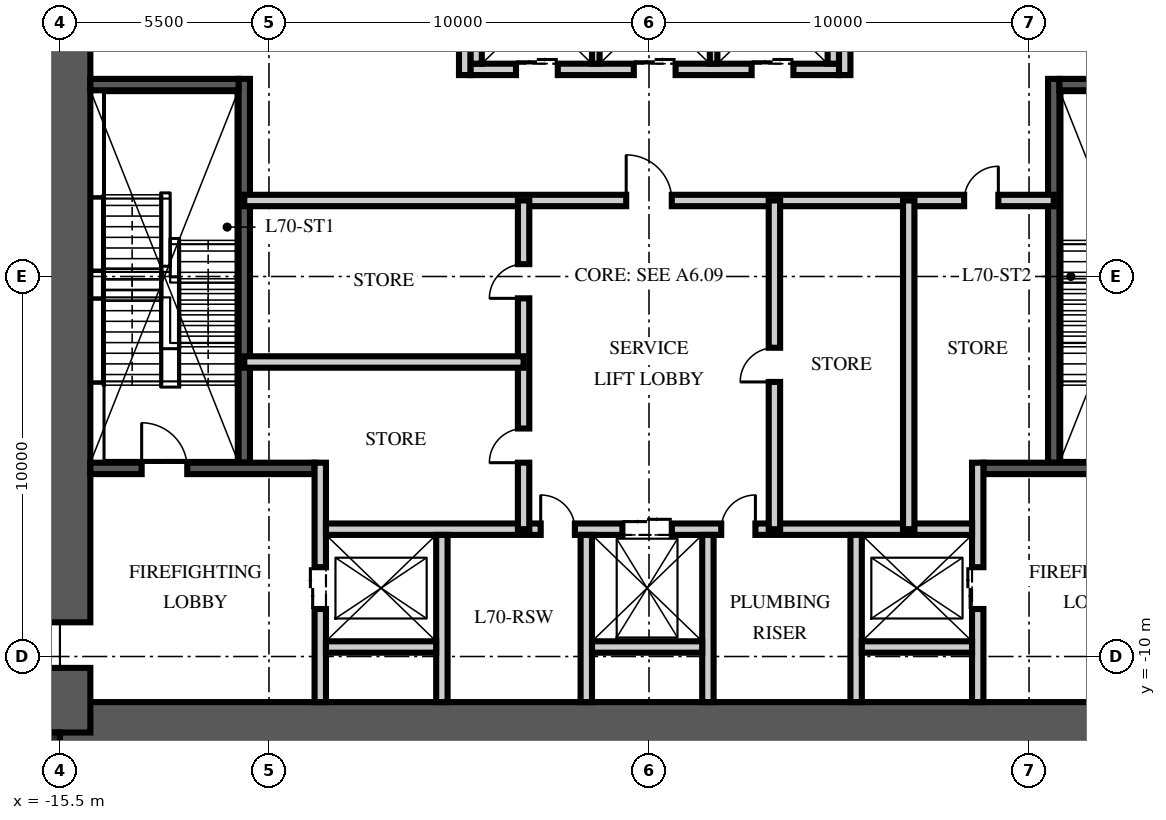
"""IFC4 building model, lengths in metres.
Left out: names, types, materials, properties, quantities, classifications, styles, units other than length and angle.
Written with IfcOpenShell. Run it as: python <this file> out.ifc"""

import sys

from ifc_helpers import new_model, si_unit, direction, frame, frame_2d, origin, origin_2d, place, context, subcontext, project, spatial, rectangle, extrude, element, fill, save


model = new_model("IFC4")
c1 = context("Model", 3, precision=1e-05, world=origin(), true_north=direction((0.0, 1.0)))
c2 = subcontext(c1, "Body", "Model", "MODEL_VIEW")
j1 = project(units=[si_unit("LENGTHUNIT", "METRE"), si_unit("PLANEANGLEUNIT", "RADIAN")], contexts=[c1])
p1 = place(None, origin())
s1 = spatial("IfcSite", under=j1, at=p1, CompositionType="ELEMENT")
p2 = place(p1, origin())
s2 = spatial("IfcBuilding", under=s1, at=p2, CompositionType="ELEMENT")
p3 = place(p2, frame((0.0, 0.0, 278.25)))
s3 = spatial("IfcBuildingStorey", under=s2, at=p3, CompositionType="ELEMENT", Elevation=278.25)
p4 = place(p3, frame((-15.5, -12.0, -0.35), z_axis=(0.0, 0.0, 1.0), x_axis=(1.0, 0.0, 0.0)))
e1 = element("IfcWall", 1, at=p4, inside=s3, PredefinedType="SHEAR", context=c2, shape_type="SweptSolid", body=[
    extrude(rectangle(XDim=31.0, YDim=1.6, at=frame_2d((15.5, 0.0))), origin(), (0.0, 0.0, 1.0), 7.6),
])
p5 = place(p3, frame((-15.5, -12.0, -0.35), z_axis=(0.0, 0.0, 1.0), x_axis=(0.0, 1.0, 0.0)))
e2 = element("IfcWall", 2, at=p5, inside=s3, PredefinedType="SHEAR", context=c2, shape_type="SweptSolid", body=[
    extrude(rectangle(XDim=24.0, YDim=1.6, at=frame_2d((12.0, 0.0))), origin(), (0.0, 0.0, 1.0), 7.6),
])
p6 = place(p5, frame((1.7, 0.0, 0.35)))
e3 = element("IfcOpeningElement", 3, at=p6, cuts=e2, PredefinedType="OPENING", context=c2, shape_type="SweptSolid", body=[
    extrude(rectangle(XDim=1.2, YDim=2.1, at=frame_2d((0.6, 1.05))), frame((0.0, 0.81, 0.0), z_axis=(0.0, -1.0, 0.0), x_axis=(1.0, 0.0, 0.0)), (0.0, 0.0, 1.0), 1.62),
])
p7 = place(p5, frame((21.1, 0.0, 0.35)))
e4 = element("IfcOpeningElement", 4, at=p7, cuts=e2, PredefinedType="OPENING", context=c2, shape_type="SweptSolid", body=[
    extrude(rectangle(XDim=1.8, YDim=2.1, at=frame_2d((0.9, 1.05))), frame((0.0, 0.81, 0.0), z_axis=(0.0, -1.0, 0.0), x_axis=(1.0, 0.0, 0.0)), (0.0, 0.0, 1.0), 1.62),
])
p8 = place(p3, frame((-15.9, -12.4, -0.35), z_axis=(0.0, 0.0, 1.0), x_axis=(1.0, 0.0, 0.0)))
e5 = element("IfcColumn", 5, at=p8, inside=s3, PredefinedType="COLUMN", context=c2, shape_type="SweptSolid", body=[
    extrude(rectangle(XDim=0.8, YDim=0.8, at=origin_2d()), origin(), (0.0, 0.0, 1.0), 7.6),
])
p9 = place(p3, frame((-10.65, -4.9, 0.0), z_axis=(0.0, 0.0, 1.0), x_axis=(0.0, 1.0, 0.0)))
e6 = element("IfcWall", 6, at=p9, inside=s3, PredefinedType="SOLIDWALL", context=c2, shape_type="SweptSolid", body=[
    extrude(rectangle(XDim=10.1, YDim=0.3, at=frame_2d((5.05, 0.0))), origin(), (0.0, 0.0, 1.0), 7.25),
])
p10 = place(p3, frame((-14.7, -5.05, 0.0), z_axis=(0.0, 0.0, 1.0), x_axis=(1.0, 0.0, 0.0)))
e7 = element("IfcWall", 7, at=p10, inside=s3, PredefinedType="SOLIDWALL", context=c2, shape_type="SweptSolid", body=[
    extrude(rectangle(XDim=5.9, YDim=0.3, at=frame_2d((2.95, 0.0))), origin(), (0.0, 0.0, 1.0), 7.25),
])
p11 = place(p10, frame((1.35, 0.0, 0.0)))
e8 = element("IfcOpeningElement", 8, at=p11, cuts=e7, PredefinedType="OPENING", context=c2, shape_type="SweptSolid", body=[
    extrude(rectangle(XDim=1.2, YDim=2.1, at=frame_2d((0.6, 1.05))), frame((0.0, 0.16, 0.0), z_axis=(0.0, -1.0, 0.0), x_axis=(1.0, 0.0, 0.0)), (0.0, 0.0, 1.0), 0.32),
])
p12 = place(p3, frame((-14.7, 5.05, 0.0), z_axis=(0.0, 0.0, 1.0), x_axis=(1.0, 0.0, 0.0)))
e9 = element("IfcWall", 9, at=p12, inside=s3, PredefinedType="SOLIDWALL", context=c2, shape_type="SweptSolid", body=[
    extrude(rectangle(XDim=3.9, YDim=0.3, at=frame_2d((1.95, 0.0))), origin(), (0.0, 0.0, 1.0), 7.25),
])
p13 = place(p3, frame((-8.65, -11.2, 0.0), z_axis=(0.0, 0.0, 1.0), x_axis=(0.0, 1.0, 0.0)))
e10 = element("IfcWall", 10, at=p13, inside=s3, PredefinedType="PARTITIONING", context=c2, shape_type="SweptSolid", body=[
    extrude(rectangle(XDim=6.3, YDim=0.3, at=frame_2d((3.15, 0.0))), origin(), (0.0, 0.0, 1.0), 7.25),
])
p14 = place(p13, frame((2.45, 0.0, 0.0)))
e11 = element("IfcOpeningElement", 11, at=p14, cuts=e10, PredefinedType="OPENING", context=c2, shape_type="SweptSolid", body=[
    extrude(rectangle(XDim=1.1, YDim=2.1, at=frame_2d((0.55, 1.05))), frame((0.0, 0.16, 0.0), z_axis=(0.0, -1.0, 0.0), x_axis=(1.0, 0.0, 0.0)), (0.0, 0.0, 1.0), 0.32),
])
p15 = place(p3, frame((10.65, -4.9, 0.0), z_axis=(0.0, 0.0, 1.0), x_axis=(0.0, 1.0, 0.0)))
e12 = element("IfcWall", 12, at=p15, inside=s3, PredefinedType="SOLIDWALL", context=c2, shape_type="SweptSolid", body=[
    extrude(rectangle(XDim=10.1, YDim=0.3, at=frame_2d((5.05, 0.0))), origin(), (0.0, 0.0, 1.0), 7.25),
])
p16 = place(p3, frame((14.7, -5.05, 0.0), z_axis=(0.0, 0.0, 1.0), x_axis=(-1.0, 0.0, 0.0)))
e13 = element("IfcWall", 13, at=p16, inside=s3, PredefinedType="SOLIDWALL", context=c2, shape_type="SweptSolid", body=[
    extrude(rectangle(XDim=5.9, YDim=0.3, at=frame_2d((2.95, 0.0))), origin(), (0.0, 0.0, 1.0), 7.25),
])
p17 = place(p16, frame((1.35, 0.0, 0.0)))
e14 = element("IfcOpeningElement", 14, at=p17, cuts=e13, PredefinedType="OPENING", context=c2, shape_type="SweptSolid", body=[
    extrude(rectangle(XDim=1.2, YDim=2.1, at=frame_2d((0.6, 1.05))), frame((0.0, 0.16, 0.0), z_axis=(0.0, -1.0, 0.0), x_axis=(1.0, 0.0, 0.0)), (0.0, 0.0, 1.0), 0.32),
])
p18 = place(p3, frame((14.7, 5.05, 0.0), z_axis=(0.0, 0.0, 1.0), x_axis=(-1.0, 0.0, 0.0)))
e15 = element("IfcWall", 15, at=p18, inside=s3, PredefinedType="SOLIDWALL", context=c2, shape_type="SweptSolid", body=[
    extrude(rectangle(XDim=3.9, YDim=0.3, at=frame_2d((1.95, 0.0))), origin(), (0.0, 0.0, 1.0), 7.25),
])
p19 = place(p3, frame((8.65, -11.2, 0.0), z_axis=(0.0, 0.0, 1.0), x_axis=(0.0, 1.0, 0.0)))
e16 = element("IfcWall", 16, at=p19, inside=s3, PredefinedType="PARTITIONING", context=c2, shape_type="SweptSolid", body=[
    extrude(rectangle(XDim=6.3, YDim=0.3, at=frame_2d((3.15, 0.0))), origin(), (0.0, 0.0, 1.0), 7.25),
])
p20 = place(p19, frame((2.45, 0.0, 0.0)))
e17 = element("IfcOpeningElement", 17, at=p20, cuts=e16, PredefinedType="OPENING", context=c2, shape_type="SweptSolid", body=[
    extrude(rectangle(XDim=1.1, YDim=2.1, at=frame_2d((0.55, 1.05))), frame((0.0, 0.16, 0.0), z_axis=(0.0, -1.0, 0.0), x_axis=(1.0, 0.0, 0.0)), (0.0, 0.0, 1.0), 0.32),
])
p21 = place(p3, frame((-8.5, -6.65, 0.0), z_axis=(0.0, 0.0, 1.0), x_axis=(1.0, 0.0, 0.0)))
e18 = element("IfcWall", 18, at=p21, inside=s3, PredefinedType="PARTITIONING", context=c2, shape_type="SweptSolid", body=[
    extrude(rectangle(XDim=17.0, YDim=0.3, at=frame_2d((8.5, 0.0))), origin(), (0.0, 0.0, 1.0), 7.25),
])
p22 = place(p21, frame((7.8, 0.0, 0.0)))
e19 = element("IfcOpeningElement", 19, at=p22, cuts=e18, PredefinedType="OPENING", context=c2, shape_type="SweptSolid", body=[
    extrude(rectangle(XDim=1.3, YDim=2.4, at=frame_2d((0.65, 1.2))), frame((0.0, 0.16, 0.0), z_axis=(0.0, -1.0, 0.0), x_axis=(1.0, 0.0, 0.0)), (0.0, 0.0, 1.0), 0.32),
])
p23 = place(p21, frame((5.65, 0.0, 0.0)))
e20 = element("IfcOpeningElement", 20, at=p23, cuts=e18, PredefinedType="OPENING", context=c2, shape_type="SweptSolid", body=[
    extrude(rectangle(XDim=0.9, YDim=2.1, at=frame_2d((0.45, 1.05))), frame((0.0, 0.16, 0.0), z_axis=(0.0, -1.0, 0.0), x_axis=(1.0, 0.0, 0.0)), (0.0, 0.0, 1.0), 0.32),
])
p24 = place(p21, frame((10.4, 0.0, 0.0)))
e21 = element("IfcOpeningElement", 21, at=p24, cuts=e18, PredefinedType="OPENING", context=c2, shape_type="SweptSolid", body=[
    extrude(rectangle(XDim=0.9, YDim=2.1, at=frame_2d((0.45, 1.05))), frame((0.0, 0.16, 0.0), z_axis=(0.0, -1.0, 0.0), x_axis=(1.0, 0.0, 0.0)), (0.0, 0.0, 1.0), 0.32),
])
for number, where, z_axis, x_axis in (
    (22, (-5.45, -11.2, 0.0), (0.0, 0.0, 1.0), (0.0, 1.0, 0.0)),
    (23, (-1.65, -11.2, 0.0), (0.0, 0.0, 1.0), (0.0, 1.0, 0.0)),
    (24, (1.55, -11.2, 0.0), (0.0, 0.0, 1.0), (0.0, 1.0, 0.0)),
    (25, (5.45, -11.2, 0.0), (0.0, 0.0, 1.0), (0.0, 1.0, 0.0)),
):
    element("IfcWall", number, at=place(p3, frame(where, z_axis=z_axis, x_axis=x_axis)), inside=s3, PredefinedType="PARTITIONING", context=c2, shape_type="SweptSolid", body=[
        extrude(rectangle(XDim=4.4, YDim=0.3, at=frame_2d((2.2, 0.0))), origin(), (0.0, 0.0, 1.0), 7.25),
    ])
for number, where, z_axis, x_axis in (
    (26, (-8.5, -9.75, 0.0), (0.0, 0.0, 1.0), (1.0, 0.0, 0.0)),
    (27, (-1.5, -9.75, 0.0), (0.0, 0.0, 1.0), (1.0, 0.0, 0.0)),
    (28, (5.6, -9.75, 0.0), (0.0, 0.0, 1.0), (1.0, 0.0, 0.0)),
):
    element("IfcWall", number, at=place(p3, frame(where, z_axis=z_axis, x_axis=x_axis)), inside=s3, PredefinedType="PARTITIONING", context=c2, shape_type="SweptSolid", body=[
        extrude(rectangle(XDim=2.9, YDim=0.3, at=frame_2d((1.45, 0.0))), origin(), (0.0, 0.0, 1.0), 7.25),
    ])
p25 = place(p3, frame((-4.7, 5.45, 0.0), z_axis=(0.0, 0.0, 1.0), x_axis=(1.0, 0.0, 0.0)))
e29 = element("IfcWall", 29, at=p25, inside=s3, PredefinedType="PARTITIONING", context=c2, shape_type="SweptSolid", body=[
    extrude(rectangle(XDim=9.7, YDim=0.3, at=frame_2d((4.85, 0.0))), origin(), (0.0, 0.0, 1.0), 7.25),
])
p26 = place(p25, frame((1.2, 0.0, 0.0)))
e30 = element("IfcOpeningElement", 30, at=p26, cuts=e29, PredefinedType="OPENING", context=c2, shape_type="SweptSolid", body=[
    extrude(rectangle(XDim=1.1, YDim=2.1, at=frame_2d((0.55, 1.05))), frame((0.0, 0.16, 0.0), z_axis=(0.0, -1.0, 0.0), x_axis=(1.0, 0.0, 0.0)), (0.0, 0.0, 1.0), 0.32),
])
p27 = place(p25, frame((4.3, 0.0, 0.0)))
e31 = element("IfcOpeningElement", 31, at=p27, cuts=e29, PredefinedType="OPENING", context=c2, shape_type="SweptSolid", body=[
    extrude(rectangle(XDim=1.1, YDim=2.1, at=frame_2d((0.55, 1.05))), frame((0.0, 0.16, 0.0), z_axis=(0.0, -1.0, 0.0), x_axis=(1.0, 0.0, 0.0)), (0.0, 0.0, 1.0), 0.32),
])
p28 = place(p25, frame((7.4, 0.0, 0.0)))
e32 = element("IfcOpeningElement", 32, at=p28, cuts=e29, PredefinedType="OPENING", context=c2, shape_type="SweptSolid", body=[
    extrude(rectangle(XDim=1.1, YDim=2.1, at=frame_2d((0.55, 1.05))), frame((0.0, 0.16, 0.0), z_axis=(0.0, -1.0, 0.0), x_axis=(1.0, 0.0, 0.0)), (0.0, 0.0, 1.0), 0.32),
])
for number, where, z_axis, x_axis in (
    (33, (-4.55, 5.6, 0.0), (0.0, 0.0, 1.0), (0.0, 1.0, 0.0)),
    (34, (4.85, 5.6, 0.0), (0.0, 0.0, 1.0), (0.0, 1.0, 0.0)),
):
    element("IfcWall", number, at=place(p3, frame(where, z_axis=z_axis, x_axis=x_axis)), inside=s3, PredefinedType="PARTITIONING", context=c2, shape_type="SweptSolid", body=[
        extrude(rectangle(XDim=2.8, YDim=0.3, at=frame_2d((1.4, 0.0))), origin(), (0.0, 0.0, 1.0), 7.25),
    ])
for number, where, z_axis, x_axis in (
    (35, (-1.4, 5.6, 0.0), (0.0, 0.0, 1.0), (0.0, 1.0, 0.0)),
    (36, (1.7, 5.6, 0.0), (0.0, 0.0, 1.0), (0.0, 1.0, 0.0)),
):
    element("IfcWall", number, at=place(p3, frame(where, z_axis=z_axis, x_axis=x_axis)), inside=s3, PredefinedType="PARTITIONING", context=c2, shape_type="SweptSolid", body=[
        extrude(rectangle(XDim=2.8, YDim=0.2, at=frame_2d((1.4, 0.0))), origin(), (0.0, 0.0, 1.0), 7.25),
    ])
p29 = place(p3, frame((-10.65, 2.0, 0.0), z_axis=(0.0, 0.0, 1.0), x_axis=(1.0, 0.0, 0.0)))
e37 = element("IfcWall", 37, at=p29, inside=s3, PredefinedType="PARTITIONING", context=c2, shape_type="SweptSolid", body=[
    extrude(rectangle(XDim=21.3, YDim=0.3, at=frame_2d((10.65, 0.0))), origin(), (0.0, 0.0, 1.0), 7.25),
])
p30 = place(p29, frame((10.05, 0.0, 0.0)))
e38 = element("IfcOpeningElement", 38, at=p30, cuts=e37, PredefinedType="OPENING", context=c2, shape_type="SweptSolid", body=[
    extrude(rectangle(XDim=1.2, YDim=2.1, at=frame_2d((0.6, 1.05))), frame((0.0, 0.16, 0.0), z_axis=(0.0, -1.0, 0.0), x_axis=(1.0, 0.0, 0.0)), (0.0, 0.0, 1.0), 0.32),
])
p31 = place(p29, frame((18.942, 0.0, 0.0)))
e39 = element("IfcOpeningElement", 39, at=p31, cuts=e37, PredefinedType="OPENING", context=c2, shape_type="SweptSolid", body=[
    extrude(rectangle(XDim=0.9, YDim=2.1, at=frame_2d((0.45, 1.05))), frame((0.0, 0.16, 0.0), z_axis=(0.0, -1.0, 0.0), x_axis=(1.0, 0.0, 0.0)), (0.0, 0.0, 1.0), 0.32),
])
p32 = place(p3, frame((-3.3, -6.65, 0.0), z_axis=(0.0, 0.0, 1.0), x_axis=(0.0, 1.0, 0.0)))
e40 = element("IfcWall", 40, at=p32, inside=s3, PredefinedType="PARTITIONING", context=c2, shape_type="SweptSolid", body=[
    extrude(rectangle(XDim=8.65, YDim=0.3, at=frame_2d((4.325, 0.0))), origin(), (0.0, 0.0, 1.0), 7.25),
])
p33 = place(p32, frame((1.75, 0.0, 0.0)))
e41 = element("IfcOpeningElement", 41, at=p33, cuts=e40, PredefinedType="OPENING", context=c2, shape_type="SweptSolid", body=[
    extrude(rectangle(XDim=0.9, YDim=2.1, at=frame_2d((0.45, 1.05))), frame((0.0, 0.16, 0.0), z_axis=(0.0, -1.0, 0.0), x_axis=(1.0, 0.0, 0.0)), (0.0, 0.0, 1.0), 0.32),
])
p34 = place(p32, frame((6.075, 0.0, 0.0)))
e42 = element("IfcOpeningElement", 42, at=p34, cuts=e40, PredefinedType="OPENING", context=c2, shape_type="SweptSolid", body=[
    extrude(rectangle(XDim=0.9, YDim=2.1, at=frame_2d((0.45, 1.05))), frame((0.0, 0.16, 0.0), z_axis=(0.0, -1.0, 0.0), x_axis=(1.0, 0.0, 0.0)), (0.0, 0.0, 1.0), 0.32),
])
p35 = place(p3, frame((3.3, -6.65, 0.0), z_axis=(0.0, 0.0, 1.0), x_axis=(0.0, 1.0, 0.0)))
e43 = element("IfcWall", 43, at=p35, inside=s3, PredefinedType="PARTITIONING", context=c2, shape_type="SweptSolid", body=[
    extrude(rectangle(XDim=8.65, YDim=0.3, at=frame_2d((4.325, 0.0))), origin(), (0.0, 0.0, 1.0), 7.25),
])
p36 = place(p35, frame((3.875, 0.0, 0.0)))
e44 = element("IfcOpeningElement", 44, at=p36, cuts=e43, PredefinedType="OPENING", context=c2, shape_type="SweptSolid", body=[
    extrude(rectangle(XDim=0.9, YDim=2.1, at=frame_2d((0.45, 1.05))), frame((0.0, 0.16, 0.0), z_axis=(0.0, -1.0, 0.0), x_axis=(1.0, 0.0, 0.0)), (0.0, 0.0, 1.0), 0.32),
])
p37 = place(p3, frame((-10.65, -2.25, 0.0), z_axis=(0.0, 0.0, 1.0), x_axis=(1.0, 0.0, 0.0)))
e45 = element("IfcWall", 45, at=p37, inside=s3, PredefinedType="PARTITIONING", context=c2, shape_type="SweptSolid", body=[
    extrude(rectangle(XDim=7.35, YDim=0.3, at=frame_2d((3.675, 0.0))), origin(), (0.0, 0.0, 1.0), 7.25),
])
p38 = place(p3, frame((6.834, -6.65, 0.0), z_axis=(0.0, 0.0, 1.0), x_axis=(0.0, 1.0, 0.0)))
e46 = element("IfcWall", 46, at=p38, inside=s3, PredefinedType="PARTITIONING", context=c2, shape_type="SweptSolid", body=[
    extrude(rectangle(XDim=8.65, YDim=0.3, at=frame_2d((4.325, 0.0))), origin(), (0.0, 0.0, 1.0), 7.25),
])
p39 = place(p3, frame((-4.85, 5.3, 0.0), z_axis=(0.0, 0.0, 1.0), x_axis=(0.0, 1.0, 0.0)))
e47 = element("IfcWall", 47, at=p39, inside=s3, PredefinedType="PARTITIONING", context=c2, shape_type="SweptSolid", body=[
    extrude(rectangle(XDim=5.9, YDim=0.3, at=frame_2d((2.95, 0.0))), origin(), (0.0, 0.0, 1.0), 7.25),
])
p40 = place(p39, frame((4.15, 0.0, 0.0)))
e48 = element("IfcOpeningElement", 48, at=p40, cuts=e47, PredefinedType="OPENING", context=c2, shape_type="SweptSolid", body=[
    extrude(rectangle(XDim=0.9, YDim=2.1, at=frame_2d((0.45, 1.05))), frame((0.0, 0.16, 0.0), z_axis=(0.0, -1.0, 0.0), x_axis=(1.0, 0.0, 0.0)), (0.0, 0.0, 1.0), 0.32),
])
p41 = place(p3, frame((5.15, 5.3, 0.0), z_axis=(0.0, 0.0, 1.0), x_axis=(0.0, 1.0, 0.0)))
e49 = element("IfcWall", 49, at=p41, inside=s3, PredefinedType="PARTITIONING", context=c2, shape_type="SweptSolid", body=[
    extrude(rectangle(XDim=5.9, YDim=0.3, at=frame_2d((2.95, 0.0))), origin(), (0.0, 0.0, 1.0), 7.25),
])
p42 = place(p41, frame((4.15, 0.0, 0.0)))
e50 = element("IfcOpeningElement", 50, at=p42, cuts=e49, PredefinedType="OPENING", context=c2, shape_type="SweptSolid", body=[
    extrude(rectangle(XDim=0.9, YDim=2.1, at=frame_2d((0.45, 1.05))), frame((0.0, 0.16, 0.0), z_axis=(0.0, -1.0, 0.0), x_axis=(1.0, 0.0, 0.0)), (0.0, 0.0, 1.0), 0.32),
])
p43 = place(p11, origin())
e51 = element("IfcDoor", 51, at=p43, inside=s3, OperationType="SINGLE_SWING_LEFT", PredefinedType="DOOR", context=c2, shape_type="SweptSolid", body=[
    extrude(rectangle(XDim=1.2, YDim=2.1, at=frame_2d((0.6, 1.05))), frame((0.0, 0.025, 0.0), z_axis=(0.0, -1.0, 0.0), x_axis=(1.0, 0.0, 0.0)), (0.0, 0.0, 1.0), 0.05),
])
fill(e8, e51)
p44 = place(p6, origin())
e52 = element("IfcDoor", 52, at=p44, inside=s3, OperationType="SINGLE_SWING_LEFT", PredefinedType="DOOR", context=c2, shape_type="SweptSolid", body=[
    extrude(rectangle(XDim=1.2, YDim=2.1, at=frame_2d((0.6, 1.05))), frame((0.0, 0.025, 0.0), z_axis=(0.0, -1.0, 0.0), x_axis=(1.0, 0.0, 0.0)), (0.0, 0.0, 1.0), 0.05),
])
fill(e3, e52)
p45 = place(p14, origin())
e53 = element("IfcDoor", 53, at=p45, inside=s3, OperationType="DOUBLE_DOOR_SLIDING", PredefinedType="DOOR", context=c2, shape_type="SweptSolid", body=[
    extrude(rectangle(XDim=1.1, YDim=2.1, at=frame_2d((0.55, 1.05))), frame((0.0, 0.025, 0.0), z_axis=(0.0, -1.0, 0.0), x_axis=(1.0, 0.0, 0.0)), (0.0, 0.0, 1.0), 0.05),
])
fill(e11, e53)
p46 = place(p20, origin())
e54 = element("IfcDoor", 54, at=p46, inside=s3, OperationType="DOUBLE_DOOR_SLIDING", PredefinedType="DOOR", context=c2, shape_type="SweptSolid", body=[
    extrude(rectangle(XDim=1.1, YDim=2.1, at=frame_2d((0.55, 1.05))), frame((0.0, 0.025, 0.0), z_axis=(0.0, -1.0, 0.0), x_axis=(1.0, 0.0, 0.0)), (0.0, 0.0, 1.0), 0.05),
])
fill(e17, e54)
p47 = place(p26, origin())
e55 = element("IfcDoor", 55, at=p47, inside=s3, OperationType="DOUBLE_DOOR_SLIDING", PredefinedType="DOOR", context=c2, shape_type="SweptSolid", body=[
    extrude(rectangle(XDim=1.1, YDim=2.1, at=frame_2d((0.55, 1.05))), frame((0.0, 0.025, 0.0), z_axis=(0.0, -1.0, 0.0), x_axis=(1.0, 0.0, 0.0)), (0.0, 0.0, 1.0), 0.05),
])
fill(e30, e55)
p48 = place(p27, origin())
e56 = element("IfcDoor", 56, at=p48, inside=s3, OperationType="DOUBLE_DOOR_SLIDING", PredefinedType="DOOR", context=c2, shape_type="SweptSolid", body=[
    extrude(rectangle(XDim=1.1, YDim=2.1, at=frame_2d((0.55, 1.05))), frame((0.0, 0.025, 0.0), z_axis=(0.0, -1.0, 0.0), x_axis=(1.0, 0.0, 0.0)), (0.0, 0.0, 1.0), 0.05),
])
fill(e31, e56)
p49 = place(p28, origin())
e57 = element("IfcDoor", 57, at=p49, inside=s3, OperationType="DOUBLE_DOOR_SLIDING", PredefinedType="DOOR", context=c2, shape_type="SweptSolid", body=[
    extrude(rectangle(XDim=1.1, YDim=2.1, at=frame_2d((0.55, 1.05))), frame((0.0, 0.025, 0.0), z_axis=(0.0, -1.0, 0.0), x_axis=(1.0, 0.0, 0.0)), (0.0, 0.0, 1.0), 0.05),
])
fill(e32, e57)
p50 = place(p22, origin())
e58 = element("IfcDoor", 58, at=p50, inside=s3, OperationType="DOUBLE_DOOR_SLIDING", PredefinedType="DOOR", context=c2, shape_type="SweptSolid", body=[
    extrude(rectangle(XDim=1.3, YDim=2.4, at=frame_2d((0.65, 1.2))), frame((0.0, 0.025, 0.0), z_axis=(0.0, -1.0, 0.0), x_axis=(1.0, 0.0, 0.0)), (0.0, 0.0, 1.0), 0.05),
])
fill(e19, e58)
p51 = place(p30, origin())
e59 = element("IfcDoor", 59, at=p51, inside=s3, OperationType="SINGLE_SWING_LEFT", PredefinedType="DOOR", context=c2, shape_type="SweptSolid", body=[
    extrude(rectangle(XDim=1.2, YDim=2.1, at=frame_2d((0.6, 1.05))), frame((0.0, 0.025, 0.0), z_axis=(0.0, -1.0, 0.0), x_axis=(1.0, 0.0, 0.0)), (0.0, 0.0, 1.0), 0.05),
])
fill(e38, e59)
p52 = place(p23, origin())
e60 = element("IfcDoor", 60, at=p52, inside=s3, OperationType="SINGLE_SWING_LEFT", PredefinedType="DOOR", context=c2, shape_type="SweptSolid", body=[
    extrude(rectangle(XDim=0.9, YDim=2.1, at=frame_2d((0.45, 1.05))), frame((0.0, 0.025, 0.0), z_axis=(0.0, -1.0, 0.0), x_axis=(1.0, 0.0, 0.0)), (0.0, 0.0, 1.0), 0.05),
])
fill(e20, e60)
p53 = place(p24, origin())
e61 = element("IfcDoor", 61, at=p53, inside=s3, OperationType="SINGLE_SWING_RIGHT", PredefinedType="DOOR", context=c2, shape_type="SweptSolid", body=[
    extrude(rectangle(XDim=0.9, YDim=2.1, at=frame_2d((0.45, 1.05))), frame((0.0, 0.025, 0.0), z_axis=(0.0, -1.0, 0.0), x_axis=(1.0, 0.0, 0.0)), (0.0, 0.0, 1.0), 0.05),
])
fill(e21, e61)
p54 = place(p33, origin())
e62 = element("IfcDoor", 62, at=p54, inside=s3, OperationType="SINGLE_SWING_LEFT", PredefinedType="DOOR", context=c2, shape_type="SweptSolid", body=[
    extrude(rectangle(XDim=0.9, YDim=2.1, at=frame_2d((0.45, 1.05))), frame((0.0, 0.025, 0.0), z_axis=(0.0, -1.0, 0.0), x_axis=(1.0, 0.0, 0.0)), (0.0, 0.0, 1.0), 0.05),
])
fill(e41, e62)
p55 = place(p34, origin())
e63 = element("IfcDoor", 63, at=p55, inside=s3, OperationType="SINGLE_SWING_LEFT", PredefinedType="DOOR", context=c2, shape_type="SweptSolid", body=[
    extrude(rectangle(XDim=0.9, YDim=2.1, at=frame_2d((0.45, 1.05))), frame((0.0, 0.025, 0.0), z_axis=(0.0, -1.0, 0.0), x_axis=(1.0, 0.0, 0.0)), (0.0, 0.0, 1.0), 0.05),
])
fill(e42, e63)
p56 = place(p36, origin())
e64 = element("IfcDoor", 64, at=p56, inside=s3, OperationType="SINGLE_SWING_LEFT", PredefinedType="DOOR", context=c2, shape_type="SweptSolid", body=[
    extrude(rectangle(XDim=0.9, YDim=2.1, at=frame_2d((0.45, 1.05))), frame((0.0, 0.025, 0.0), z_axis=(0.0, -1.0, 0.0), x_axis=(1.0, 0.0, 0.0)), (0.0, 0.0, 1.0), 0.05),
])
fill(e44, e64)
p57 = place(p31, origin())
e65 = element("IfcDoor", 65, at=p57, inside=s3, OperationType="SINGLE_SWING_RIGHT", PredefinedType="DOOR", context=c2, shape_type="SweptSolid", body=[
    extrude(rectangle(XDim=0.9, YDim=2.1, at=frame_2d((0.45, 1.05))), frame((0.0, 0.025, 0.0), z_axis=(0.0, -1.0, 0.0), x_axis=(1.0, 0.0, 0.0)), (0.0, 0.0, 1.0), 0.05),
])
fill(e39, e65)
save(model, sys.argv[1])
